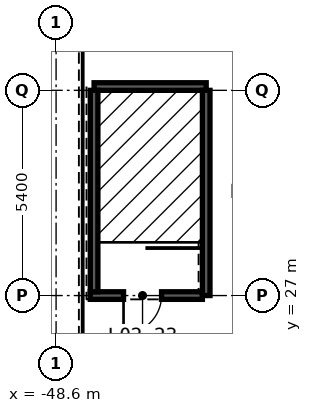
"""IFC4 building model, lengths in metres.
Left out: names, types, materials, properties, quantities, classifications, styles, units other than length and angle.
Written with IfcOpenShell. Run it as: python <this file> out.ifc"""

import sys

from ifc_helpers import new_model, si_unit, direction, frame, frame_2d, origin, place, context, subcontext, project, spatial, rectangle, extrude, element, fill, save


model = new_model("IFC4")
c1 = context("Model", 3, precision=1e-05, world=origin(), true_north=direction((0.0, 1.0)))
c2 = subcontext(c1, "Body", "Model", "MODEL_VIEW")
j1 = project(units=[si_unit("LENGTHUNIT", "METRE"), si_unit("PLANEANGLEUNIT", "RADIAN")], contexts=[c1])
p1 = place(None, origin())
s1 = spatial("IfcSite", under=j1, at=p1, CompositionType="ELEMENT")
p2 = place(p1, origin())
s2 = spatial("IfcBuilding", under=s1, at=p2, CompositionType="ELEMENT")
p3 = place(p2, frame((0.0, 0.0, 9.0)))
s3 = spatial("IfcBuildingStorey", under=s2, at=p3, CompositionType="ELEMENT", Elevation=9.0)
p4 = place(p3, frame((-47.7, 27.0, 0.0), z_axis=(0.0, 0.0, 1.0), x_axis=(1.0, 0.0, 0.0)))
e1 = element("IfcWall", 1, at=p4, inside=s3, PredefinedType="SOLIDWALL", context=c2, shape_type="SweptSolid", body=[
    extrude(rectangle(XDim=2.95, YDim=0.2, at=frame_2d((1.475, 0.0))), origin(), (0.0, 0.0, 1.0), 3.0),
])
p5 = place(p4, frame((1.875, 0.0, 0.0), z_axis=(0.0, 0.0, 1.0), x_axis=(-1.0, 0.0, 0.0)))
e2 = element("IfcOpeningElement", 2, at=p5, cuts=e1, PredefinedType="OPENING", context=c2, shape_type="SweptSolid", body=[
    extrude(rectangle(XDim=1.0, YDim=2.1, at=frame_2d((0.5, 1.05))), frame((0.0, 0.11, 0.0), z_axis=(0.0, -1.0, 0.0), x_axis=(1.0, 0.0, 0.0)), (0.0, 0.0, 1.0), 0.22),
])
p6 = place(p3, frame((-47.6, 32.5, 0.0), z_axis=(0.0, 0.0, 1.0), x_axis=(1.0, 0.0, 0.0)))
e3 = element("IfcWall", 3, at=p6, inside=s3, PredefinedType="SOLIDWALL", context=c2, shape_type="SweptSolid", body=[
    extrude(rectangle(XDim=2.95, YDim=0.2, at=frame_2d((1.475, 0.0))), origin(), (0.0, 0.0, 1.0), 3.0),
])
p7 = place(p3, frame((-47.6, 27.1, 0.0), z_axis=(0.0, 0.0, 1.0), x_axis=(0.0, 1.0, 0.0)))
e4 = element("IfcWall", 4, at=p7, inside=s3, PredefinedType="SOLIDWALL", context=c2, shape_type="SweptSolid", body=[
    extrude(rectangle(XDim=5.3, YDim=0.2, at=frame_2d((2.65, 0.0))), origin(), (0.0, 0.0, 1.0), 3.0),
])
p8 = place(p3, frame((-44.65, 27.0, 0.0), z_axis=(0.0, 0.0, 1.0), x_axis=(0.0, 1.0, 0.0)))
e5 = element("IfcWall", 5, at=p8, inside=s3, PredefinedType="SOLIDWALL", context=c2, shape_type="SweptSolid", body=[
    extrude(rectangle(XDim=5.4, YDim=0.2, at=frame_2d((2.7, 0.0))), origin(), (0.0, 0.0, 1.0), 3.0),
])
p9 = place(p5, origin())
e6 = element("IfcDoor", 6, at=p9, inside=s3, OperationType="SINGLE_SWING_RIGHT", PredefinedType="DOOR", context=c2, shape_type="SweptSolid", body=[
    extrude(rectangle(XDim=1.0, YDim=2.1, at=frame_2d((0.5, 1.05))), frame((0.0, 0.025, 0.0), z_axis=(0.0, -1.0, 0.0), x_axis=(1.0, 0.0, 0.0)), (0.0, 0.0, 1.0), 0.05),
])
fill(e2, e6)
save(model, sys.argv[1])
